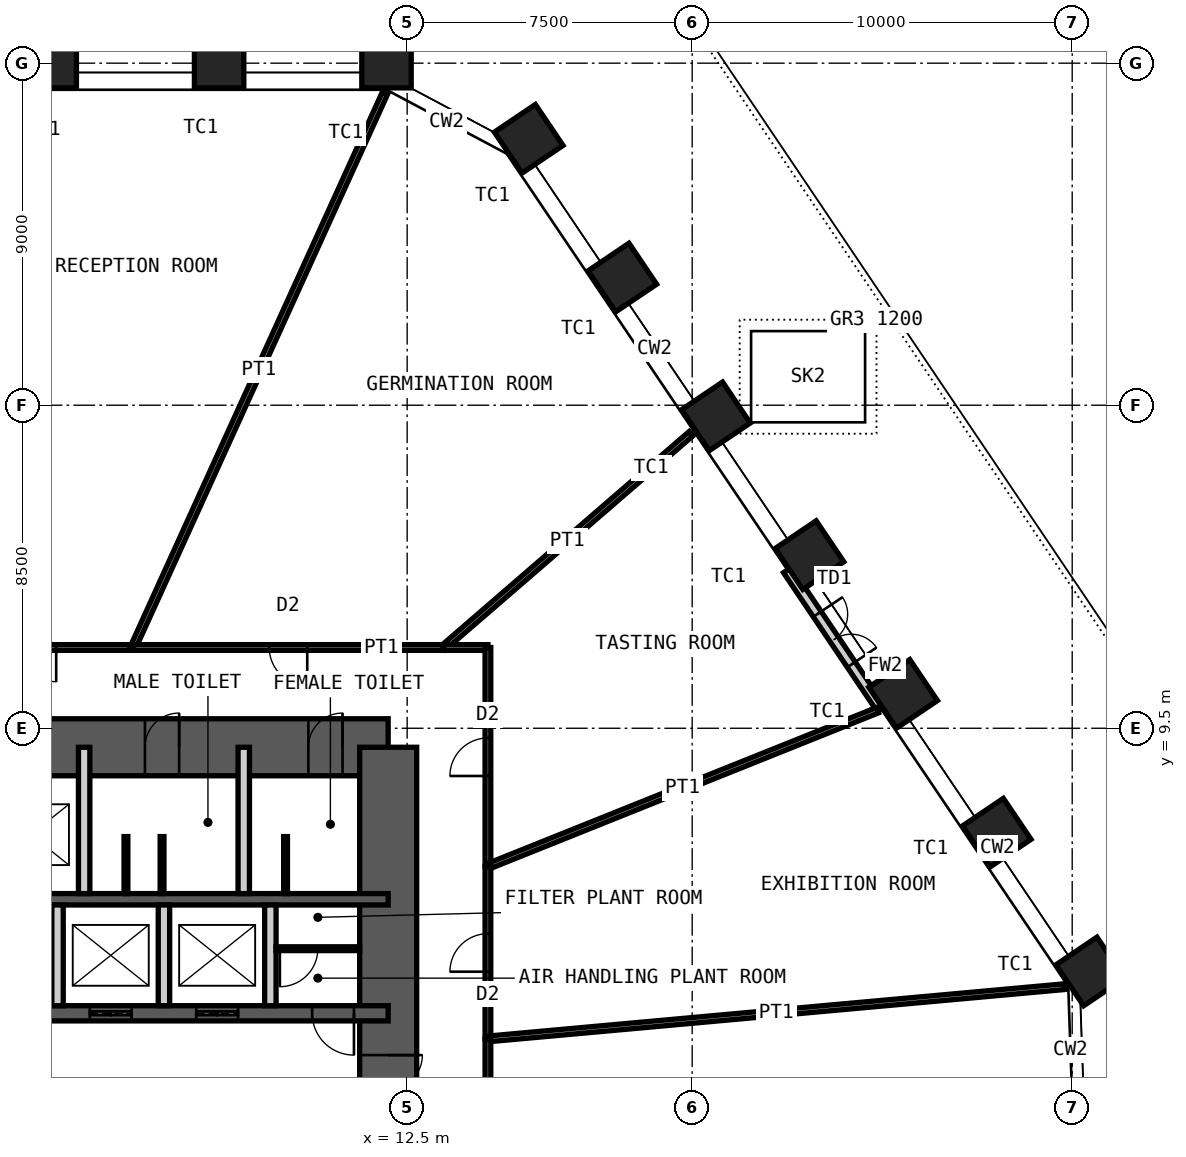
"""IFC4 building model, lengths in metres.
Left out: names, types, materials, properties, quantities, classifications, styles, units other than length and angle.
Written with IfcOpenShell. Run it as: python <this file> out.ifc"""

import sys

from ifc_helpers import new_model, si_unit, direction, frame, frame_2d, origin, origin_2d, place, context, subcontext, project, spatial, rectangle, hollow_rectangle, extrude, element, fill, save


model = new_model("IFC4")
c1 = context("Model", 3, precision=1e-05, world=origin(), true_north=direction((0.0, 1.0)))
c2 = subcontext(c1, "Body", "Model", "MODEL_VIEW")
j1 = project(units=[si_unit("LENGTHUNIT", "METRE"), si_unit("PLANEANGLEUNIT", "RADIAN")], contexts=[c1])
p1 = place(None, origin())
s1 = spatial("IfcSite", under=j1, at=p1, CompositionType="ELEMENT")
p2 = place(p1, origin())
s2 = spatial("IfcBuilding", under=s1, at=p2, CompositionType="ELEMENT")
p3 = place(p2, frame((0.0, 0.0, 17.0)))
s3 = spatial("IfcBuildingStorey", under=s2, at=p3, CompositionType="ELEMENT", Elevation=17.0)
for number, where, z_axis, x_axis in (
    (1, (3.147, 27.0, 0.0), (0.0, 0.0, 1.0), (-1.0, 0.0, 0.0)),
    (2, (7.552, 27.0, 0.0), (0.0, 0.0, 1.0), (-1.0, 0.0, 0.0)),
    (3, (11.956, 27.0, 0.0), (0.0, 0.0, 1.0), (-1.0, 0.0, 0.0)),
    (4, (15.698, 25.01, 0.0), (0.0, 0.0, 1.0), (-0.559, 0.829, 0.0)),
    (5, (18.161, 21.359, 0.0), (0.0, 0.0, 1.0), (-0.559, 0.829, 0.0)),
    (6, (20.624, 17.707, 0.0), (0.0, 0.0, 1.0), (-0.559, 0.829, 0.0)),
    (7, (23.087, 14.056, 0.0), (0.0, 0.0, 1.0), (-0.559, 0.829, 0.0)),
    (8, (25.55, 10.404, 0.0), (0.0, 0.0, 1.0), (-0.559, 0.829, 0.0)),
    (9, (28.013, 6.752, 0.0), (0.0, 0.0, 1.0), (-0.559, 0.829, 0.0)),
    (10, (30.476, 3.101, 0.0), (0.0, 0.0, 1.0), (-0.559, 0.829, 0.0)),
):
    element("IfcColumn", number, at=place(p3, frame(where, z_axis=z_axis, x_axis=x_axis)), inside=s3, PredefinedType="COLUMN", context=c2, shape_type="SweptSolid", body=[
        extrude(hollow_rectangle(XDim=1.3, YDim=1.3, WallThickness=0.1, at=origin_2d()), origin(), (0.0, 0.0, 1.0), 5.0),
    ])
p4 = place(p3, frame((-12.0, 9.0, 0.0), z_axis=(0.0, 0.0, 1.0), x_axis=(1.0, 0.0, 0.0)))
e11 = element("IfcWall", 11, at=p4, inside=s3, PredefinedType="SHEAR", context=c2, shape_type="SweptSolid", body=[
    extrude(rectangle(XDim=24.0, YDim=1.5, at=frame_2d((12.0, 0.0))), origin(), (0.0, 0.0, 1.0), 5.0),
])
p5 = place(p4, frame((10.4, 0.0, 0.0)))
e12 = element("IfcOpeningElement", 12, at=p5, cuts=e11, PredefinedType="OPENING", context=c2, shape_type="SweptSolid", body=[
    extrude(rectangle(XDim=1.0, YDim=2.1, at=frame_2d((0.5, 1.05))), frame((0.0, 0.76, 0.0), z_axis=(0.0, -1.0, 0.0), x_axis=(1.0, 0.0, 0.0)), (0.0, 0.0, 1.0), 1.52),
])
p6 = place(p4, frame((17.6, 0.0, 0.0)))
e13 = element("IfcOpeningElement", 13, at=p6, cuts=e11, PredefinedType="OPENING", context=c2, shape_type="SweptSolid", body=[
    extrude(rectangle(XDim=0.9, YDim=2.1, at=frame_2d((0.45, 1.05))), frame((0.0, 0.76, 0.0), z_axis=(0.0, -1.0, 0.0), x_axis=(1.0, 0.0, 0.0)), (0.0, 0.0, 1.0), 1.52),
])
p7 = place(p4, frame((21.9, 0.0, 0.0)))
e14 = element("IfcOpeningElement", 14, at=p7, cuts=e11, PredefinedType="OPENING", context=c2, shape_type="SweptSolid", body=[
    extrude(rectangle(XDim=0.9, YDim=2.1, at=frame_2d((0.45, 1.05))), frame((0.0, 0.76, 0.0), z_axis=(0.0, -1.0, 0.0), x_axis=(1.0, 0.0, 0.0)), (0.0, 0.0, 1.0), 1.52),
])
p8 = place(p3, frame((12.0, -9.0, 0.0), z_axis=(0.0, 0.0, 1.0), x_axis=(0.0, 1.0, 0.0)))
e15 = element("IfcWall", 15, at=p8, inside=s3, PredefinedType="SHEAR", context=c2, shape_type="SweptSolid", body=[
    extrude(rectangle(XDim=18.0, YDim=1.5, at=frame_2d((9.0, 0.0))), origin(), (0.0, 0.0, 1.0), 5.0),
])
p9 = place(p8, frame((8.1, 0.0, 0.0)))
e16 = element("IfcOpeningElement", 16, at=p9, cuts=e15, PredefinedType="OPENING", context=c2, shape_type="SweptSolid", body=[
    extrude(rectangle(XDim=1.8, YDim=2.1, at=frame_2d((0.9, 1.05))), frame((0.0, 0.76, 0.0), z_axis=(0.0, -1.0, 0.0), x_axis=(1.0, 0.0, 0.0)), (0.0, 0.0, 1.0), 1.52),
])
p10 = place(p3, frame((-12.0, 5.0, 0.0), z_axis=(0.0, 0.0, 1.0), x_axis=(1.0, 0.0, 0.0)))
e17 = element("IfcWall", 17, at=p10, inside=s3, PredefinedType="SHEAR", context=c2, shape_type="SweptSolid", body=[
    extrude(rectangle(XDim=24.0, YDim=0.3, at=frame_2d((12.0, 0.0))), origin(), (0.0, 0.0, 1.0), 5.0),
])
p11 = place(p3, frame((-12.0, 2.0, 0.0), z_axis=(0.0, 0.0, 1.0), x_axis=(1.0, 0.0, 0.0)))
e18 = element("IfcWall", 18, at=p11, inside=s3, PredefinedType="SHEAR", context=c2, shape_type="SweptSolid", body=[
    extrude(rectangle(XDim=24.0, YDim=0.4, at=frame_2d((12.0, 0.0))), origin(), (0.0, 0.0, 1.0), 5.0),
])
p12 = place(p11, frame((2.4, 0.0, 0.0)))
e19 = element("IfcOpeningElement", 19, at=p12, cuts=e18, PredefinedType="OPENING", context=c2, shape_type="SweptSolid", body=[
    extrude(rectangle(XDim=1.1, YDim=2.1, at=frame_2d((0.55, 1.05))), frame((0.0, 0.21, 0.0), z_axis=(0.0, -1.0, 0.0), x_axis=(1.0, 0.0, 0.0)), (0.0, 0.0, 1.0), 0.42),
])
p13 = place(p11, frame((22.0, 0.0, 0.0)))
e20 = element("IfcOpeningElement", 20, at=p13, cuts=e18, PredefinedType="OPENING", context=c2, shape_type="SweptSolid", body=[
    extrude(rectangle(XDim=1.1, YDim=2.1, at=frame_2d((0.55, 1.05))), frame((0.0, 0.21, 0.0), z_axis=(0.0, -1.0, 0.0), x_axis=(1.0, 0.0, 0.0)), (0.0, 0.0, 1.0), 0.42),
])
p14 = place(p11, frame((10.15, 0.0, 0.0)))
e21 = element("IfcOpeningElement", 21, at=p14, cuts=e18, PredefinedType="OPENING", context=c2, shape_type="SweptSolid", body=[
    extrude(rectangle(XDim=1.0, YDim=2.1, at=frame_2d((0.5, 1.05))), frame((0.0, 0.21, 0.0), z_axis=(0.0, -1.0, 0.0), x_axis=(1.0, 0.0, 0.0)), (0.0, 0.0, 1.0), 0.42),
])
p15 = place(p11, frame((6.7, 0.0, 0.0)))
e22 = element("IfcOpeningElement", 22, at=p15, cuts=e18, PredefinedType="OPENING", context=c2, shape_type="SweptSolid", body=[
    extrude(rectangle(XDim=1.4, YDim=2.4, at=frame_2d((0.7, 1.2))), frame((0.0, 0.21, 0.0), z_axis=(0.0, -1.0, 0.0), x_axis=(1.0, 0.0, 0.0)), (0.0, 0.0, 1.0), 0.42),
])
p16 = place(p11, frame((13.35, 0.0, 0.0)))
e23 = element("IfcOpeningElement", 23, at=p16, cuts=e18, PredefinedType="OPENING", context=c2, shape_type="SweptSolid", body=[
    extrude(rectangle(XDim=1.1, YDim=2.4, at=frame_2d((0.55, 1.2))), frame((0.0, 0.21, 0.0), z_axis=(0.0, -1.0, 0.0), x_axis=(1.0, 0.0, 0.0)), (0.0, 0.0, 1.0), 0.42),
])
p17 = place(p11, frame((16.15, 0.0, 0.0)))
e24 = element("IfcOpeningElement", 24, at=p17, cuts=e18, PredefinedType="OPENING", context=c2, shape_type="SweptSolid", body=[
    extrude(rectangle(XDim=1.1, YDim=2.4, at=frame_2d((0.55, 1.2))), frame((0.0, 0.21, 0.0), z_axis=(0.0, -1.0, 0.0), x_axis=(1.0, 0.0, 0.0)), (0.0, 0.0, 1.0), 0.42),
])
p18 = place(p11, frame((18.95, 0.0, 0.0)))
e25 = element("IfcOpeningElement", 25, at=p18, cuts=e18, PredefinedType="OPENING", context=c2, shape_type="SweptSolid", body=[
    extrude(rectangle(XDim=1.1, YDim=2.4, at=frame_2d((0.55, 1.2))), frame((0.0, 0.21, 0.0), z_axis=(0.0, -1.0, 0.0), x_axis=(1.0, 0.0, 0.0)), (0.0, 0.0, 1.0), 0.42),
])
for number, where, z_axis, x_axis in (
    (26, (4.0, 5.15, 0.0), (0.0, 0.0, 1.0), (0.0, 1.0, 0.0)),
    (27, (8.2, 5.15, 0.0), (0.0, 0.0, 1.0), (0.0, 1.0, 0.0)),
):
    element("IfcWall", number, at=place(p3, frame(where, z_axis=z_axis, x_axis=x_axis)), inside=s3, PredefinedType="PARTITIONING", context=c2, shape_type="SweptSolid", body=[
        extrude(rectangle(XDim=3.85, YDim=0.3, at=frame_2d((1.925, 0.0))), origin(), (0.0, 0.0, 1.0), 4.78),
    ])
for number, where, z_axis, x_axis in (
    (28, (3.3, 2.2, 0.0), (0.0, 0.0, 1.0), (0.0, 1.0, 0.0)),
    (29, (6.1, 2.2, 0.0), (0.0, 0.0, 1.0), (0.0, 1.0, 0.0)),
    (30, (8.9, 2.2, 0.0), (0.0, 0.0, 1.0), (0.0, 1.0, 0.0)),
):
    element("IfcWall", number, at=place(p3, frame(where, z_axis=z_axis, x_axis=x_axis)), inside=s3, PredefinedType="PARTITIONING", context=c2, shape_type="SweptSolid", body=[
        extrude(rectangle(XDim=2.65, YDim=0.3, at=frame_2d((1.325, 0.0))), origin(), (0.0, 0.0, 1.0), 4.78),
    ])
p19 = place(p3, frame((22.507, 13.664, 0.0), z_axis=(0.0, 0.0, 1.0), x_axis=(0.559169135272, -0.829053603912, 0.0)))
e31 = element("IfcWall", 31, at=p19, inside=s3, PredefinedType="SOLIDWALL", context=c2, shape_type="SweptSolid", body=[
    extrude(rectangle(XDim=4.405, YDim=0.25, at=frame_2d((2.202, 0.0))), origin(), (0.0, 0.0, 1.0), 4.8),
])
p20 = place(p19, frame((1.402, 0.0, 0.0)))
e32 = element("IfcOpeningElement", 32, at=p20, cuts=e31, PredefinedType="OPENING", context=c2, shape_type="SweptSolid", body=[
    extrude(rectangle(XDim=1.6, YDim=2.4, at=frame_2d((0.8, 1.2))), frame((0.0, 0.135, 0.0), z_axis=(0.0, -1.0, 0.0), x_axis=(1.0, 0.0, 0.0)), (0.0, 0.0, 1.0), 0.27),
])
p21 = place(p3, frame((9.05, 3.7, 0.0), z_axis=(0.0, 0.0, 1.0), x_axis=(1.0, 0.0, 0.0)))
e33 = element("IfcWall", 33, at=p21, inside=s3, PredefinedType="PARTITIONING", context=c2, shape_type="SweptSolid", body=[
    extrude(rectangle(XDim=2.2, YDim=0.1, at=frame_2d((1.1, 0.0))), origin(), (0.0, 0.0, 1.0), 4.78),
])
p22 = place(p21, frame((0.1, 0.0, 0.0)))
e34 = element("IfcOpeningElement", 34, at=p22, cuts=e33, PredefinedType="OPENING", context=c2, shape_type="SweptSolid", body=[
    extrude(rectangle(XDim=1.0, YDim=2.4, at=frame_2d((0.5, 1.2))), frame((0.0, 0.06, 0.0), z_axis=(0.0, -1.0, 0.0), x_axis=(1.0, 0.0, 0.0)), (0.0, 0.0, 1.0), 0.12),
])
for number, where, z_axis, x_axis in (
    (35, (5.1, 5.15, 0.0), (0.0, 0.0, 1.0), (0.0, 1.0, 0.0)),
    (36, (6.05, 5.15, 0.0), (0.0, 0.0, 1.0), (0.0, 1.0, 0.0)),
    (37, (9.3, 5.15, 0.0), (0.0, 0.0, 1.0), (0.0, 1.0, 0.0)),
):
    element("IfcWall", number, at=place(p3, frame(where, z_axis=z_axis, x_axis=x_axis)), inside=s3, PredefinedType="PARTITIONING", context=c2, shape_type="SweptSolid", body=[
        extrude(rectangle(XDim=1.5, YDim=0.1, at=frame_2d((0.75, 0.0))), origin(), (0.0, 0.0, 1.0), 2.1),
    ])
p23 = place(p3, frame((-0.556, 11.625, 0.0), z_axis=(0.0, 0.0, 1.0), x_axis=(1.0, 0.0, 0.0)))
e38 = element("IfcWall", 38, at=p23, inside=s3, PredefinedType="PARTITIONING", context=c2, shape_type="SweptSolid", body=[
    extrude(rectangle(XDim=5.841, YDim=0.15, at=frame_2d((2.92, 0.0))), origin(), (0.0, 0.0, 1.0), 4.8),
])
p24 = place(p23, frame((2.02, 0.0, 0.0)))
e39 = element("IfcOpeningElement", 39, at=p24, cuts=e38, PredefinedType="OPENING", context=c2, shape_type="SweptSolid", body=[
    extrude(rectangle(XDim=1.8, YDim=2.4, at=frame_2d((0.9, 1.2))), frame((0.0, 0.085, 0.0), z_axis=(0.0, -1.0, 0.0), x_axis=(1.0, 0.0, 0.0)), (0.0, 0.0, 1.0), 0.17),
])
p25 = place(p3, frame((11.915, 26.209, 0.0), z_axis=(0.0, 0.0, 1.0), x_axis=(-0.41384427845, -0.910347688081, 0.0)))
e40 = element("IfcWall", 40, at=p25, inside=s3, PredefinedType="PARTITIONING", context=c2, shape_type="SweptSolid", body=[
    extrude(rectangle(XDim=16.02, YDim=0.15, at=frame_2d((8.01, 0.0))), origin(), (0.0, 0.0, 1.0), 3.7),
])
p26 = place(p3, frame((5.285, 11.625, 0.0), z_axis=(0.0, 0.0, 1.0), x_axis=(1.0, 0.0, 0.0)))
e41 = element("IfcWall", 41, at=p26, inside=s3, PredefinedType="PARTITIONING", context=c2, shape_type="SweptSolid", body=[
    extrude(rectangle(XDim=8.172, YDim=0.15, at=frame_2d((4.086, 0.0))), origin(), (0.0, 0.0, 1.0), 4.8),
])
p27 = place(p26, frame((3.586, 0.0, 0.0)))
e42 = element("IfcOpeningElement", 42, at=p27, cuts=e41, PredefinedType="OPENING", context=c2, shape_type="SweptSolid", body=[
    extrude(rectangle(XDim=1.0, YDim=2.4, at=frame_2d((0.5, 1.2))), frame((0.0, 0.085, 0.0), z_axis=(0.0, -1.0, 0.0), x_axis=(1.0, 0.0, 0.0)), (0.0, 0.0, 1.0), 0.17),
])
p28 = place(p3, frame((19.968, 17.25, 0.0), z_axis=(0.0, 0.0, 1.0), x_axis=(-0.75673751601, -0.65371884772, 0.0)))
e43 = element("IfcWall", 43, at=p28, inside=s3, PredefinedType="PARTITIONING", context=c2, shape_type="SweptSolid", body=[
    extrude(rectangle(XDim=8.605, YDim=0.15, at=frame_2d((4.302, 0.0))), origin(), (0.0, 0.0, 1.0), 3.7),
])
p29 = place(p3, frame((13.457, 11.625, 0.0), z_axis=(0.0, 0.0, 1.0), x_axis=(1.0, 0.0, 0.0)))
e44 = element("IfcWall", 44, at=p29, inside=s3, PredefinedType="PARTITIONING", context=c2, shape_type="SweptSolid", body=[
    extrude(rectangle(XDim=1.168, YDim=0.15, at=frame_2d((0.584, 0.0))), origin(), (0.0, 0.0, 1.0), 4.8),
])
p30 = place(p3, frame((14.625, 11.625, 0.0), z_axis=(0.0, 0.0, 1.0), x_axis=(0.0, -1.0, 0.0)))
e45 = element("IfcWall", 45, at=p30, inside=s3, PredefinedType="PARTITIONING", context=c2, shape_type="SweptSolid", body=[
    extrude(rectangle(XDim=5.761, YDim=0.15, at=frame_2d((2.88, 0.0))), origin(), (0.0, 0.0, 1.0), 4.8),
])
p31 = place(p30, frame((2.38, 0.0, 0.0)))
e46 = element("IfcOpeningElement", 46, at=p31, cuts=e45, PredefinedType="OPENING", context=c2, shape_type="SweptSolid", body=[
    extrude(rectangle(XDim=1.0, YDim=2.4, at=frame_2d((0.5, 1.2))), frame((0.0, 0.085, 0.0), z_axis=(0.0, -1.0, 0.0), x_axis=(1.0, 0.0, 0.0)), (0.0, 0.0, 1.0), 0.17),
])
p32 = place(p3, frame((24.877, 9.975, 0.0), z_axis=(0.0, 0.0, 1.0), x_axis=(-0.928157765849, -0.372186998288, 0.0)))
e47 = element("IfcWall", 47, at=p32, inside=s3, PredefinedType="PARTITIONING", context=c2, shape_type="SweptSolid", body=[
    extrude(rectangle(XDim=11.046, YDim=0.15, at=frame_2d((5.523, 0.0))), origin(), (0.0, 0.0, 1.0), 3.7),
])
p33 = place(p3, frame((14.625, 5.864, 0.0), z_axis=(0.0, 0.0, 1.0), x_axis=(0.0, -1.0, 0.0)))
e48 = element("IfcWall", 48, at=p33, inside=s3, PredefinedType="PARTITIONING", context=c2, shape_type="SweptSolid", body=[
    extrude(rectangle(XDim=4.539, YDim=0.15, at=frame_2d((2.27, 0.0))), origin(), (0.0, 0.0, 1.0), 4.8),
])
p34 = place(p33, frame((1.77, 0.0, 0.0)))
e49 = element("IfcOpeningElement", 49, at=p34, cuts=e48, PredefinedType="OPENING", context=c2, shape_type="SweptSolid", body=[
    extrude(rectangle(XDim=1.0, YDim=2.4, at=frame_2d((0.5, 1.2))), frame((0.0, 0.085, 0.0), z_axis=(0.0, -1.0, 0.0), x_axis=(1.0, 0.0, 0.0)), (0.0, 0.0, 1.0), 0.17),
])
p35 = place(p3, frame((29.796, 2.7, 0.0), z_axis=(0.0, 0.0, 1.0), x_axis=(-0.99591812791, -0.090261190441, 0.0)))
e50 = element("IfcWall", 50, at=p35, inside=s3, PredefinedType="PARTITIONING", context=c2, shape_type="SweptSolid", body=[
    extrude(rectangle(XDim=15.234, YDim=0.15, at=frame_2d((7.617, 0.0))), origin(), (0.0, 0.0, 1.0), 3.7),
])
p36 = place(p3, frame((14.625, 1.325, 0.0), z_axis=(0.0, 0.0, 1.0), x_axis=(0.0, -1.0, 0.0)))
e51 = element("IfcWall", 51, at=p36, inside=s3, PredefinedType="PARTITIONING", context=c2, shape_type="SweptSolid", body=[
    extrude(rectangle(XDim=12.95, YDim=0.15, at=frame_2d((6.475, 0.0))), origin(), (0.0, 0.0, 1.0), 4.8),
])
p37 = place(p36, frame((5.575, 0.0, 0.0)))
e52 = element("IfcOpeningElement", 52, at=p37, cuts=e51, PredefinedType="OPENING", context=c2, shape_type="SweptSolid", body=[
    extrude(rectangle(XDim=1.8, YDim=2.4, at=frame_2d((0.9, 1.2))), frame((0.0, 0.085, 0.0), z_axis=(0.0, -1.0, 0.0), x_axis=(1.0, 0.0, 0.0)), (0.0, 0.0, 1.0), 0.17),
])
p38 = place(p20, origin())
e53 = element("IfcDoor", 53, at=p38, inside=s3, OperationType="DOUBLE_DOOR_DOUBLE_SWING", PredefinedType="DOOR", context=c2, shape_type="SweptSolid", body=[
    extrude(rectangle(XDim=1.6, YDim=2.4, at=frame_2d((0.8, 1.2))), frame((0.0, 0.025, 0.0), z_axis=(0.0, -1.0, 0.0), x_axis=(1.0, 0.0, 0.0)), (0.0, 0.0, 1.0), 0.05),
])
fill(e32, e53)
p39 = place(p6, origin())
e54 = element("IfcDoor", 54, at=p39, inside=s3, OperationType="SINGLE_SWING_LEFT", PredefinedType="DOOR", context=c2, shape_type="SweptSolid", body=[
    extrude(rectangle(XDim=0.9, YDim=2.1, at=frame_2d((0.45, 1.05))), frame((0.0, 0.025, 0.0), z_axis=(0.0, -1.0, 0.0), x_axis=(1.0, 0.0, 0.0)), (0.0, 0.0, 1.0), 0.05),
])
fill(e13, e54)
p40 = place(p7, origin())
e55 = element("IfcDoor", 55, at=p40, inside=s3, OperationType="SINGLE_SWING_LEFT", PredefinedType="DOOR", context=c2, shape_type="SweptSolid", body=[
    extrude(rectangle(XDim=0.9, YDim=2.1, at=frame_2d((0.45, 1.05))), frame((0.0, 0.025, 0.0), z_axis=(0.0, -1.0, 0.0), x_axis=(1.0, 0.0, 0.0)), (0.0, 0.0, 1.0), 0.05),
])
fill(e14, e55)
p41 = place(p13, origin())
e56 = element("IfcDoor", 56, at=p41, inside=s3, OperationType="SINGLE_SWING_RIGHT", PredefinedType="DOOR", context=c2, shape_type="SweptSolid", body=[
    extrude(rectangle(XDim=1.1, YDim=2.1, at=frame_2d((0.55, 1.05))), frame((0.0, 0.025, 0.0), z_axis=(0.0, -1.0, 0.0), x_axis=(1.0, 0.0, 0.0)), (0.0, 0.0, 1.0), 0.05),
])
fill(e20, e56)
p42 = place(p9, origin())
e57 = element("IfcDoor", 57, at=p42, inside=s3, OperationType="DOUBLE_DOOR_DOUBLE_SWING", PredefinedType="DOOR", context=c2, shape_type="SweptSolid", body=[
    extrude(rectangle(XDim=1.8, YDim=2.1, at=frame_2d((0.9, 1.05))), frame((0.0, 0.025, 0.0), z_axis=(0.0, -1.0, 0.0), x_axis=(1.0, 0.0, 0.0)), (0.0, 0.0, 1.0), 0.05),
])
fill(e16, e57)
p43 = place(p17, origin())
e58 = element("IfcDoor", 58, at=p43, inside=s3, OperationType="DOUBLE_DOOR_SLIDING", PredefinedType="DOOR", context=c2, shape_type="SweptSolid", body=[
    extrude(rectangle(XDim=1.1, YDim=2.4, at=frame_2d((0.55, 1.2))), frame((0.0, 0.025, 0.0), z_axis=(0.0, -1.0, 0.0), x_axis=(1.0, 0.0, 0.0)), (0.0, 0.0, 1.0), 0.05),
])
fill(e24, e58)
p44 = place(p18, origin())
e59 = element("IfcDoor", 59, at=p44, inside=s3, OperationType="DOUBLE_DOOR_SLIDING", PredefinedType="DOOR", context=c2, shape_type="SweptSolid", body=[
    extrude(rectangle(XDim=1.1, YDim=2.4, at=frame_2d((0.55, 1.2))), frame((0.0, 0.025, 0.0), z_axis=(0.0, -1.0, 0.0), x_axis=(1.0, 0.0, 0.0)), (0.0, 0.0, 1.0), 0.05),
])
fill(e25, e59)
p45 = place(p22, origin())
e60 = element("IfcDoor", 60, at=p45, inside=s3, OperationType="SINGLE_SWING_LEFT", PredefinedType="DOOR", context=c2, shape_type="SweptSolid", body=[
    extrude(rectangle(XDim=1.0, YDim=2.4, at=frame_2d((0.5, 1.2))), frame((0.0, 0.025, 0.0), z_axis=(0.0, -1.0, 0.0), x_axis=(1.0, 0.0, 0.0)), (0.0, 0.0, 1.0), 0.05),
])
fill(e34, e60)
p46 = place(p24, origin())
e61 = element("IfcDoor", 61, at=p46, inside=s3, OperationType="DOUBLE_DOOR_DOUBLE_SWING", PredefinedType="DOOR", context=c2, shape_type="SweptSolid", body=[
    extrude(rectangle(XDim=1.8, YDim=2.4, at=frame_2d((0.9, 1.2))), frame((0.0, 0.025, 0.0), z_axis=(0.0, -1.0, 0.0), x_axis=(1.0, 0.0, 0.0)), (0.0, 0.0, 1.0), 0.05),
])
fill(e39, e61)
p47 = place(p27, origin())
e62 = element("IfcDoor", 62, at=p47, inside=s3, OperationType="SINGLE_SWING_RIGHT", PredefinedType="DOOR", context=c2, shape_type="SweptSolid", body=[
    extrude(rectangle(XDim=1.0, YDim=2.4, at=frame_2d((0.5, 1.2))), frame((0.0, 0.025, 0.0), z_axis=(0.0, -1.0, 0.0), x_axis=(1.0, 0.0, 0.0)), (0.0, 0.0, 1.0), 0.05),
])
fill(e42, e62)
p48 = place(p31, origin())
e63 = element("IfcDoor", 63, at=p48, inside=s3, OperationType="SINGLE_SWING_RIGHT", PredefinedType="DOOR", context=c2, shape_type="SweptSolid", body=[
    extrude(rectangle(XDim=1.0, YDim=2.4, at=frame_2d((0.5, 1.2))), frame((0.0, 0.025, 0.0), z_axis=(0.0, -1.0, 0.0), x_axis=(1.0, 0.0, 0.0)), (0.0, 0.0, 1.0), 0.05),
])
fill(e46, e63)
p49 = place(p34, origin())
e64 = element("IfcDoor", 64, at=p49, inside=s3, OperationType="SINGLE_SWING_RIGHT", PredefinedType="DOOR", context=c2, shape_type="SweptSolid", body=[
    extrude(rectangle(XDim=1.0, YDim=2.4, at=frame_2d((0.5, 1.2))), frame((0.0, 0.025, 0.0), z_axis=(0.0, -1.0, 0.0), x_axis=(1.0, 0.0, 0.0)), (0.0, 0.0, 1.0), 0.05),
])
fill(e49, e64)
p50 = place(p3, frame((0.0, 0.0, -0.3)))
p51 = place(p50, frame((23.05, 18.75, 0.0)))
p52 = place(p51, frame((0.0, 0.0, 0.25)))
e65 = element("IfcWindow", 65, at=p52, inside=s3, PartitioningType="SINGLE_PANEL", PredefinedType="SKYLIGHT", context=c2, shape_type="SweptSolid", body=[
    extrude(rectangle(XDim=3.0, YDim=2.4, at=origin_2d()), origin(), (0.0, 0.0, 1.0), 0.05),
])
save(model, sys.argv[1])
